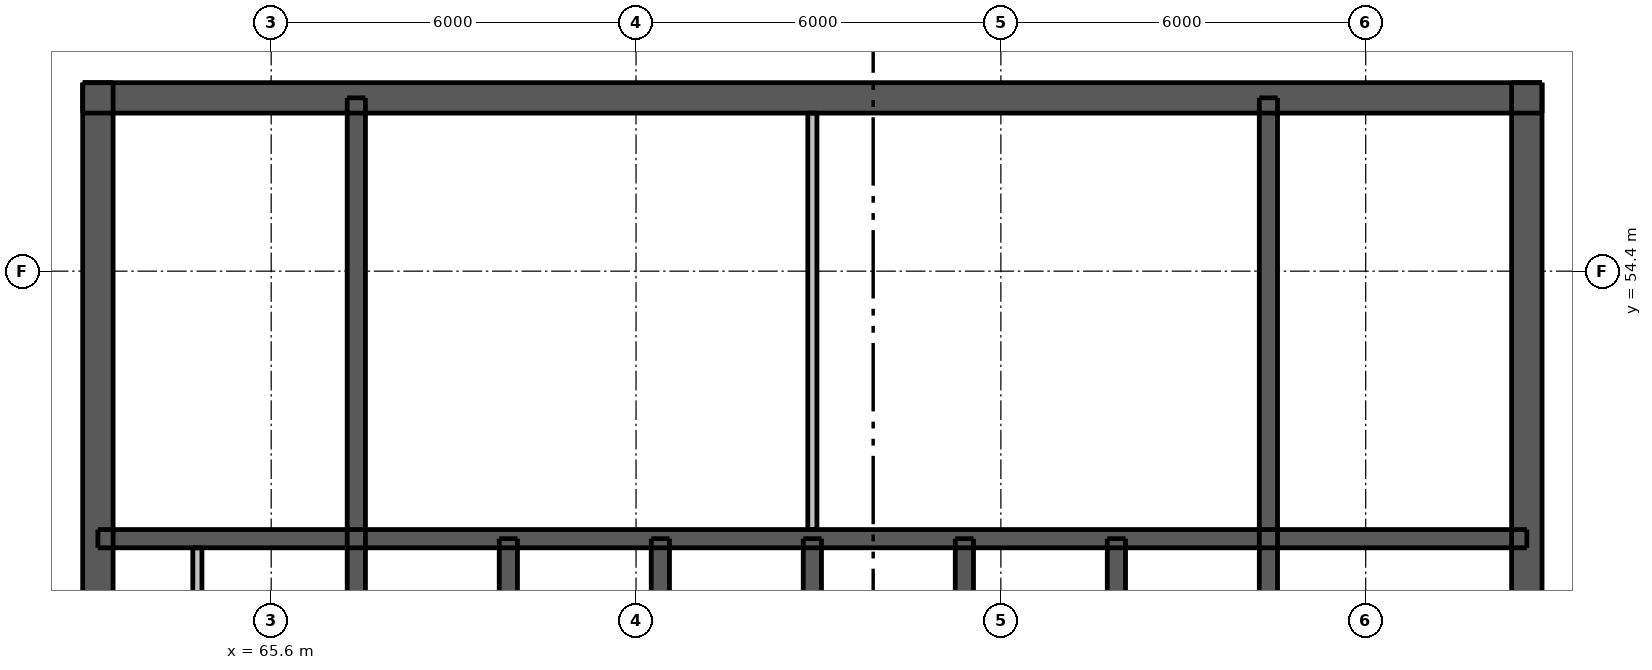
"""IFC4 building model, lengths in metres.
Left out: names, types, materials, properties, quantities, classifications, styles, units other than length and angle.
Written with IfcOpenShell. Run it as: python <this file> out.ifc"""

import sys

from ifc_helpers import new_model, si_unit, direction, frame, frame_2d, origin, place, context, subcontext, project, spatial, rectangle, extrude, element, fill, save


model = new_model("IFC4")
c1 = context("Model", 3, precision=1e-05, world=origin(), true_north=direction((0.0, 1.0)))
c2 = subcontext(c1, "Body", "Model", "MODEL_VIEW")
j1 = project(units=[si_unit("LENGTHUNIT", "METRE"), si_unit("PLANEANGLEUNIT", "RADIAN")], contexts=[c1])
p1 = place(None, origin())
s1 = spatial("IfcSite", under=j1, at=p1, CompositionType="ELEMENT")
p2 = place(p1, origin())
s2 = spatial("IfcBuilding", under=s1, at=p2, CompositionType="ELEMENT")
p3 = place(p2, frame((0.0, 0.0, 275.2)))
s3 = spatial("IfcBuildingStorey", under=s2, at=p3, CompositionType="ELEMENT", Elevation=275.2)
p4 = place(p3, frame((62.5, 57.25, 0.0), z_axis=(0.0, 0.0, 1.0), x_axis=(1.0, 0.0, 0.0)))
e1 = element("IfcWall", 1, at=p4, inside=s3, PredefinedType="SHEAR", context=c2, shape_type="SweptSolid", body=[
    extrude(rectangle(XDim=24.0, YDim=0.5, at=frame_2d((12.0, 0.0))), origin(), (0.0, 0.0, 1.0), 3.05),
])
p5 = place(p4, frame((21.025, 0.0, 0.0)))
e2 = element("IfcOpeningElement", 2, at=p5, cuts=e1, PredefinedType="OPENING", context=c2, shape_type="SweptSolid", body=[
    extrude(rectangle(XDim=1.1, YDim=2.1, at=frame_2d((0.55, 1.05))), frame((0.0, 0.26, 0.0), z_axis=(0.0, -1.0, 0.0), x_axis=(1.0, 0.0, 0.0)), (0.0, 0.0, 1.0), 0.52),
])
p6 = place(p4, frame((1.875, 0.0, 0.0)))
e3 = element("IfcOpeningElement", 3, at=p6, cuts=e1, PredefinedType="OPENING", context=c2, shape_type="SweptSolid", body=[
    extrude(rectangle(XDim=1.1, YDim=2.1, at=frame_2d((0.55, 1.05))), frame((0.0, 0.26, 0.0), z_axis=(0.0, -1.0, 0.0), x_axis=(1.0, 0.0, 0.0)), (0.0, 0.0, 1.0), 0.52),
])
p7 = place(p4, frame((7.875, 0.0, 0.0)))
e4 = element("IfcOpeningElement", 4, at=p7, cuts=e1, PredefinedType="OPENING", context=c2, shape_type="SweptSolid", body=[
    extrude(rectangle(XDim=0.9, YDim=2.1, at=frame_2d((0.45, 1.05))), frame((0.0, 0.26, 0.0), z_axis=(0.0, -1.0, 0.0), x_axis=(1.0, 0.0, 0.0)), (0.0, 0.0, 1.0), 0.52),
])
p8 = place(p4, frame((15.225, 0.0, 0.0)))
e5 = element("IfcOpeningElement", 5, at=p8, cuts=e1, PredefinedType="OPENING", context=c2, shape_type="SweptSolid", body=[
    extrude(rectangle(XDim=0.9, YDim=2.1, at=frame_2d((0.45, 1.05))), frame((0.0, 0.26, 0.0), z_axis=(0.0, -1.0, 0.0), x_axis=(1.0, 0.0, 0.0)), (0.0, 0.0, 1.0), 0.52),
])
p9 = place(p3, frame((62.75, 33.5, 0.0), z_axis=(0.0, 0.0, 1.0), x_axis=(0.0, 1.0, 0.0)))
e6 = element("IfcWall", 6, at=p9, inside=s3, PredefinedType="SHEAR", context=c2, shape_type="SweptSolid", body=[
    extrude(rectangle(XDim=24.0, YDim=0.5, at=frame_2d((12.0, 0.0))), origin(), (0.0, 0.0, 1.0), 3.05),
])
p10 = place(p9, frame((11.2, 0.0, 0.0)))
e7 = element("IfcOpeningElement", 7, at=p10, cuts=e6, PredefinedType="OPENING", context=c2, shape_type="SweptSolid", body=[
    extrude(rectangle(XDim=1.6, YDim=2.1, at=frame_2d((0.8, 1.05))), frame((0.0, 0.26, 0.0), z_axis=(0.0, -1.0, 0.0), x_axis=(1.0, 0.0, 0.0)), (0.0, 0.0, 1.0), 0.52),
])
p11 = place(p3, frame((86.25, 33.5, 0.0), z_axis=(0.0, 0.0, 1.0), x_axis=(0.0, 1.0, 0.0)))
e8 = element("IfcWall", 8, at=p11, inside=s3, PredefinedType="SHEAR", context=c2, shape_type="SweptSolid", body=[
    extrude(rectangle(XDim=24.0, YDim=0.5, at=frame_2d((12.0, 0.0))), origin(), (0.0, 0.0, 1.0), 3.05),
])
p12 = place(p11, frame((11.2, 0.0, 0.0)))
e9 = element("IfcOpeningElement", 9, at=p12, cuts=e8, PredefinedType="OPENING", context=c2, shape_type="SweptSolid", body=[
    extrude(rectangle(XDim=1.6, YDim=2.1, at=frame_2d((0.8, 1.05))), frame((0.0, 0.26, 0.0), z_axis=(0.0, -1.0, 0.0), x_axis=(1.0, 0.0, 0.0)), (0.0, 0.0, 1.0), 0.52),
])
p13 = place(p3, frame((62.75, 50.0, 0.0), z_axis=(0.0, 0.0, 1.0), x_axis=(1.0, 0.0, 0.0)))
e10 = element("IfcWall", 10, at=p13, inside=s3, PredefinedType="SHEAR", context=c2, shape_type="SweptSolid", body=[
    extrude(rectangle(XDim=23.5, YDim=0.3, at=frame_2d((11.75, 0.0))), origin(), (0.0, 0.0, 1.0), 3.05),
])
for number, where, z_axis, x_axis in (
    (11, (67.0, 47.1, 0.0), (0.0, 0.0, 1.0), (0.0, 1.0, 0.0)),
    (12, (82.0, 47.1, 0.0), (0.0, 0.0, 1.0), (0.0, 1.0, 0.0)),
):
    element("IfcWall", number, at=place(p3, frame(where, z_axis=z_axis, x_axis=x_axis)), inside=s3, PredefinedType="SHEAR", context=c2, shape_type="SweptSolid", body=[
        extrude(rectangle(XDim=10.15, YDim=0.3, at=frame_2d((5.075, 0.0))), origin(), (0.0, 0.0, 1.0), 3.05),
    ])
for number, where, z_axis, x_axis in (
    (13, (69.5, 47.1, 0.0), (0.0, 0.0, 1.0), (0.0, 1.0, 0.0)),
    (14, (72.0, 47.1, 0.0), (0.0, 0.0, 1.0), (0.0, 1.0, 0.0)),
    (15, (74.5, 47.1, 0.0), (0.0, 0.0, 1.0), (0.0, 1.0, 0.0)),
    (16, (77.0, 47.1, 0.0), (0.0, 0.0, 1.0), (0.0, 1.0, 0.0)),
    (17, (79.5, 47.1, 0.0), (0.0, 0.0, 1.0), (0.0, 1.0, 0.0)),
):
    element("IfcWall", number, at=place(p3, frame(where, z_axis=z_axis, x_axis=x_axis)), inside=s3, PredefinedType="SHEAR", context=c2, shape_type="SweptSolid", body=[
        extrude(rectangle(XDim=2.9, YDim=0.3, at=frame_2d((1.45, 0.0))), origin(), (0.0, 0.0, 1.0), 3.05),
    ])
p14 = place(p3, frame((64.386, 47.25, 0.0), z_axis=(0.0, 0.0, 1.0), x_axis=(0.0, 1.0, 0.0)))
e18 = element("IfcWall", 18, at=p14, inside=s3, PredefinedType="PLUMBINGWALL", context=c2, shape_type="SweptSolid", body=[
    extrude(rectangle(XDim=2.6, YDim=0.15, at=frame_2d((1.3, 0.0))), origin(), (0.0, 0.0, 1.0), 3.05),
])
p15 = place(p3, frame((74.5, 50.15, 0.0), z_axis=(0.0, 0.0, 1.0), x_axis=(0.0, 1.0, 0.0)))
e19 = element("IfcWall", 19, at=p15, inside=s3, PredefinedType="PLUMBINGWALL", context=c2, shape_type="SweptSolid", body=[
    extrude(rectangle(XDim=6.85, YDim=0.15, at=frame_2d((3.425, 0.0))), origin(), (0.0, 0.0, 1.0), 3.05),
])
p16 = place(p5, origin())
e20 = element("IfcDoor", 20, at=p16, inside=s3, OperationType="SINGLE_SWING_RIGHT", PredefinedType="DOOR", context=c2, shape_type="SweptSolid", body=[
    extrude(rectangle(XDim=1.1, YDim=2.1, at=frame_2d((0.55, 1.05))), frame((0.0, -0.188, 0.0), z_axis=(0.0, -1.0, 0.0), x_axis=(1.0, 0.0, 0.0)), (0.0, 0.0, 1.0), 0.05),
])
fill(e2, e20)
p17 = place(p6, origin())
e21 = element("IfcDoor", 21, at=p17, inside=s3, OperationType="SINGLE_SWING_LEFT", PredefinedType="DOOR", context=c2, shape_type="SweptSolid", body=[
    extrude(rectangle(XDim=1.1, YDim=2.1, at=frame_2d((0.55, 1.05))), frame((0.0, -0.188, 0.0), z_axis=(0.0, -1.0, 0.0), x_axis=(1.0, 0.0, 0.0)), (0.0, 0.0, 1.0), 0.05),
])
fill(e3, e21)
p18 = place(p7, origin())
e22 = element("IfcDoor", 22, at=p18, inside=s3, OperationType="SINGLE_SWING_RIGHT", PredefinedType="DOOR", context=c2, shape_type="SweptSolid", body=[
    extrude(rectangle(XDim=0.9, YDim=2.1, at=frame_2d((0.45, 1.05))), frame((0.0, -0.188, 0.0), z_axis=(0.0, -1.0, 0.0), x_axis=(1.0, 0.0, 0.0)), (0.0, 0.0, 1.0), 0.05),
])
fill(e4, e22)
p19 = place(p8, origin())
e23 = element("IfcDoor", 23, at=p19, inside=s3, OperationType="SINGLE_SWING_RIGHT", PredefinedType="DOOR", context=c2, shape_type="SweptSolid", body=[
    extrude(rectangle(XDim=0.9, YDim=2.1, at=frame_2d((0.45, 1.05))), frame((0.0, -0.188, 0.0), z_axis=(0.0, -1.0, 0.0), x_axis=(1.0, 0.0, 0.0)), (0.0, 0.0, 1.0), 0.05),
])
fill(e5, e23)
save(model, sys.argv[1])
